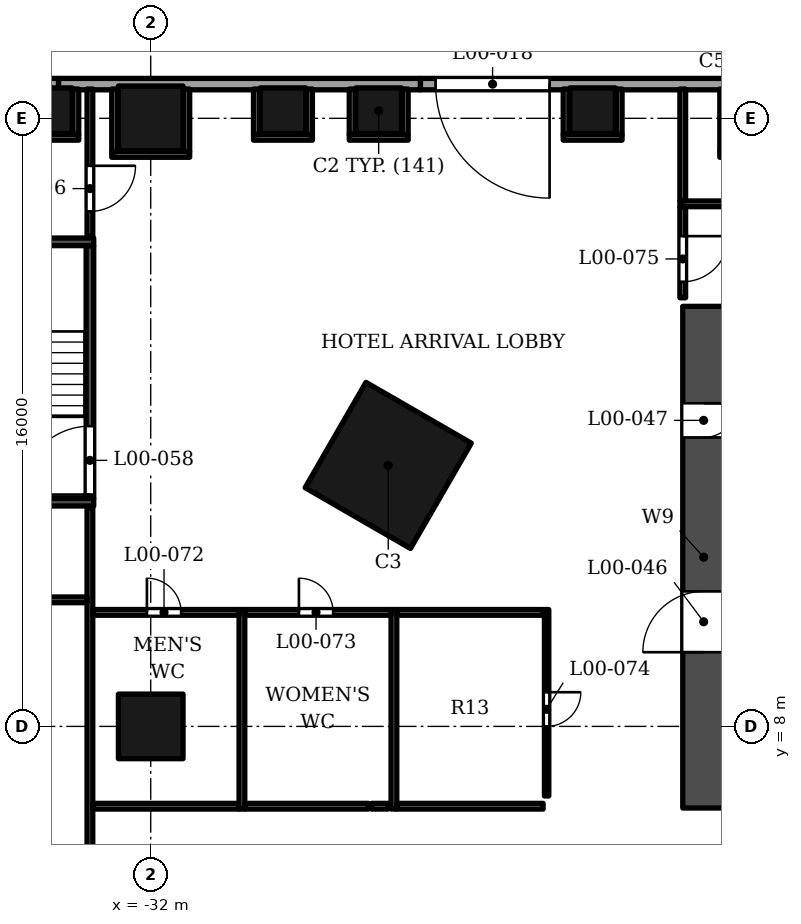
"""IFC4 building model, lengths in metres.
Left out: names, types, materials, properties, quantities, classifications, styles, units other than length and angle.
Written with IfcOpenShell. Run it as: python <this file> out.ifc"""

import sys

from ifc_helpers import new_model, si_unit, direction, frame, frame_2d, origin, origin_2d, place, context, subcontext, project, spatial, rectangle, extrude, element, fill, save


model = new_model("IFC4")
c1 = context("Model", 3, precision=1e-05, world=origin(), true_north=direction((0.0, 1.0)))
c2 = subcontext(c1, "Body", "Model", "MODEL_VIEW")
j1 = project(units=[si_unit("LENGTHUNIT", "METRE"), si_unit("PLANEANGLEUNIT", "RADIAN")], contexts=[c1])
p1 = place(None, origin())
s1 = spatial("IfcSite", under=j1, at=p1, CompositionType="ELEMENT")
p2 = place(p1, origin())
s2 = spatial("IfcBuilding", under=s1, at=p2, CompositionType="ELEMENT")
p3 = place(p2, origin())
s3 = spatial("IfcBuildingStorey", under=s2, at=p3, CompositionType="ELEMENT", Elevation=0.0)
for number, where, z_axis, x_axis in (
    (1, (-32.0, 8.0, 0.0), (0.0, 0.0, 1.0), (1.0, 0.0, 0.0)),
    (2, (-32.0, 24.0, 0.0), (0.0, 0.0, 1.0), (1.0, 0.0, 0.0)),
):
    element("IfcColumn", number, at=place(p3, frame(where, z_axis=z_axis, x_axis=x_axis)), inside=s3, PredefinedType="COLUMN", context=c2, shape_type="SweptSolid", body=[
        extrude(rectangle(XDim=1.7, YDim=1.7, at=origin_2d()), origin(), (0.0, 0.0, 1.0), 9.0),
    ])
for number, where, z_axis, x_axis in (
    (3, (-34.669, 24.2, 0.0), (0.0, 0.0, 1.0), (1.0, 0.0, 0.0)),
    (4, (-26.002, 24.2, 0.0), (0.0, 0.0, 1.0), (1.0, 0.0, 0.0)),
    (5, (-28.52, 24.2, 0.0), (0.0, 0.0, 1.0), (1.0, 0.0, 0.0)),
    (6, (-20.372, 24.2, 0.0), (0.0, 0.0, 1.0), (1.0, 0.0, 0.0)),
):
    element("IfcColumn", number, at=place(p3, frame(where, z_axis=z_axis, x_axis=x_axis)), inside=s3, PredefinedType="COLUMN", context=c2, shape_type="SweptSolid", body=[
        extrude(rectangle(XDim=1.2, YDim=1.2, at=origin_2d()), origin(), (0.0, 0.0, 1.0), 9.0),
    ])
p4 = place(p3, frame((-25.75, 14.867, 0.0), z_axis=(0.0, 0.0, 1.0), x_axis=(0.866025386331, -0.50000003023, 0.0)))
e7 = element("IfcColumn", 7, at=p4, inside=s3, PredefinedType="COLUMN", context=c2, shape_type="SweptSolid", body=[
    extrude(rectangle(XDim=3.2, YDim=3.2, at=origin_2d()), origin(), (0.0, 0.0, 1.0), 9.0),
])
p5 = place(p3, frame((-17.45, 5.853, 0.0), z_axis=(0.0, 0.0, 1.0), x_axis=(0.0, 1.0, 0.0)))
e8 = element("IfcWall", 8, at=p5, inside=s3, PredefinedType="SHEAR", context=c2, shape_type="SweptSolid", body=[
    extrude(rectangle(XDim=13.2, YDim=1.1, at=frame_2d((6.6, 0.0))), origin(), (0.0, 0.0, 1.0), 9.0),
])
p6 = place(p5, frame((4.1, 0.0, 0.0)))
e9 = element("IfcOpeningElement", 9, at=p6, cuts=e8, PredefinedType="OPENING", context=c2, shape_type="SweptSolid", body=[
    extrude(rectangle(XDim=1.6, YDim=2.1, at=frame_2d((0.8, 1.05))), frame((0.0, 0.56, 0.0), z_axis=(0.0, -1.0, 0.0), x_axis=(1.0, 0.0, 0.0)), (0.0, 0.0, 1.0), 1.12),
])
p7 = place(p5, frame((9.75, 0.0, 0.0)))
e10 = element("IfcOpeningElement", 10, at=p7, cuts=e8, PredefinedType="OPENING", context=c2, shape_type="SweptSolid", body=[
    extrude(rectangle(XDim=0.9, YDim=2.1, at=frame_2d((0.45, 1.05))), frame((0.0, 0.56, 0.0), z_axis=(0.0, -1.0, 0.0), x_axis=(1.0, 0.0, 0.0)), (0.0, 0.0, 1.0), 1.12),
])
p8 = place(p3, frame((0.246, 24.9, 0.0), z_axis=(0.0, 0.0, 1.0), x_axis=(-1.0, 0.0, 0.0)))
e11 = element("IfcWall", 11, at=p8, inside=s3, PredefinedType="ELEMENTEDWALL", context=c2, shape_type="SweptSolid", body=[
    extrude(rectangle(XDim=25.15, YDim=0.3, at=frame_2d((12.575, 0.0))), origin(), (0.0, 0.0, 1.0), 7.6),
])
p9 = place(p8, frame((21.75, 0.0, 0.0)))
e12 = element("IfcOpeningElement", 12, at=p9, cuts=e11, PredefinedType="OPENING", context=c2, shape_type="SweptSolid", body=[
    extrude(rectangle(XDim=3.0, YDim=2.7, at=frame_2d((1.5, 1.35))), frame((0.0, 0.16, 0.0), z_axis=(0.0, -1.0, 0.0), x_axis=(1.0, 0.0, 0.0)), (0.0, 0.0, 1.0), 0.32),
])
for number, where, z_axis, x_axis in (
    (13, (-24.904, 24.9, 0.0), (0.0, 0.0, 1.0), (-1.0, 0.0, 0.0)),
    (14, (-34.427, 24.9, 0.0), (0.0, 0.0, 1.0), (-1.0, 0.0, 0.0)),
):
    element("IfcWall", number, at=place(p3, frame(where, z_axis=z_axis, x_axis=x_axis)), inside=s3, PredefinedType="SOLIDWALL", context=c2, shape_type="SweptSolid", body=[
        extrude(rectangle(XDim=9.523, YDim=0.3, at=frame_2d((4.761, 0.0))), origin(), (0.0, 0.0, 1.0), 7.6),
    ])
for number, where, z_axis, x_axis in (
    (15, (-38.37, 13.9, 0.0), (0.0, 0.0, 1.0), (1.0, 0.0, 0.0)),
    (16, (-38.37, 20.75, 0.0), (0.0, 0.0, 1.0), (1.0, 0.0, 0.0)),
):
    element("IfcWall", number, at=place(p3, frame(where, z_axis=z_axis, x_axis=x_axis)), inside=s3, PredefinedType="SOLIDWALL", context=c2, shape_type="SweptSolid", body=[
        extrude(rectangle(XDim=4.87, YDim=0.2, at=frame_2d((2.435, 0.0))), origin(), (0.0, 0.0, 1.0), 8.5),
    ])
p10 = place(p3, frame((-33.6, 14.0, 0.0), z_axis=(0.0, 0.0, 1.0), x_axis=(0.0, 1.0, 0.0)))
e17 = element("IfcWall", 17, at=p10, inside=s3, PredefinedType="SOLIDWALL", context=c2, shape_type="SweptSolid", body=[
    extrude(rectangle(XDim=6.65, YDim=0.2, at=frame_2d((3.325, 0.0))), origin(), (0.0, 0.0, 1.0), 8.5),
])
p11 = place(p10, frame((0.1, 0.0, 0.0)))
e18 = element("IfcOpeningElement", 18, at=p11, cuts=e17, PredefinedType="OPENING", context=c2, shape_type="SweptSolid", body=[
    extrude(rectangle(XDim=1.8, YDim=2.4, at=frame_2d((0.9, 1.2))), frame((0.0, 0.11, 0.0), z_axis=(0.0, -1.0, 0.0), x_axis=(1.0, 0.0, 0.0)), (0.0, 0.0, 1.0), 0.22),
])
p12 = place(p3, frame((-33.6, 4.69, 0.0), z_axis=(0.0, 0.0, 1.0), x_axis=(0.0, 1.0, 0.0)))
e19 = element("IfcWall", 19, at=p12, inside=s3, PredefinedType="PARTITIONING", context=c2, shape_type="SweptSolid", body=[
    extrude(rectangle(XDim=9.07, YDim=0.15, at=frame_2d((4.535, 0.0))), origin(), (0.0, 0.0, 1.0), 7.3),
])
p13 = place(p3, frame((-33.525, 5.9, 0.0), z_axis=(0.0, 0.0, 1.0), x_axis=(1.0, 0.0, 0.0)))
e20 = element("IfcWall", 20, at=p13, inside=s3, PredefinedType="PARTITIONING", context=c2, shape_type="SweptSolid", body=[
    extrude(rectangle(XDim=3.85, YDim=0.15, at=frame_2d((1.925, 0.0))), origin(), (0.0, 0.0, 1.0), 7.3),
])
p14 = place(p3, frame((-29.6, 5.825, 0.0), z_axis=(0.0, 0.0, 1.0), x_axis=(0.0, 1.0, 0.0)))
e21 = element("IfcWall", 21, at=p14, inside=s3, PredefinedType="PARTITIONING", context=c2, shape_type="SweptSolid", body=[
    extrude(rectangle(XDim=5.25, YDim=0.15, at=frame_2d((2.625, 0.0))), origin(), (0.0, 0.0, 1.0), 7.3),
])
p15 = place(p3, frame((-29.525, 5.9, 0.0), z_axis=(0.0, 0.0, 1.0), x_axis=(1.0, 0.0, 0.0)))
e22 = element("IfcWall", 22, at=p15, inside=s3, PredefinedType="PARTITIONING", context=c2, shape_type="SweptSolid", body=[
    extrude(rectangle(XDim=3.255, YDim=0.15, at=frame_2d((1.627, 0.0))), origin(), (0.0, 0.0, 1.0), 8.5),
])
p16 = place(p3, frame((-25.6, 5.825, 0.0), z_axis=(0.0, 0.0, 1.0), x_axis=(0.0, 1.0, 0.0)))
e23 = element("IfcWall", 23, at=p16, inside=s3, PredefinedType="PARTITIONING", context=c2, shape_type="SweptSolid", body=[
    extrude(rectangle(XDim=5.25, YDim=0.15, at=frame_2d((2.625, 0.0))), origin(), (0.0, 0.0, 1.0), 7.3),
])
p17 = place(p3, frame((-25.525, 5.9, 0.0), z_axis=(0.0, 0.0, 1.0), x_axis=(1.0, 0.0, 0.0)))
e24 = element("IfcWall", 24, at=p17, inside=s3, PredefinedType="PARTITIONING", context=c2, shape_type="SweptSolid", body=[
    extrude(rectangle(XDim=3.85, YDim=0.15, at=frame_2d((1.925, 0.0))), origin(), (0.0, 0.0, 1.0), 7.6),
])
p18 = place(p3, frame((-21.583, 6.17, 0.0), z_axis=(0.0, 0.0, 1.0), x_axis=(0.0, 1.0, 0.0)))
e25 = element("IfcWall", 25, at=p18, inside=s3, PredefinedType="PARTITIONING", context=c2, shape_type="SweptSolid", body=[
    extrude(rectangle(XDim=4.905, YDim=0.115, at=frame_2d((2.453, 0.0))), origin(), (0.0, 0.0, 1.0), 7.3),
])
p19 = place(p18, frame((1.83, 0.0, 0.0)))
e26 = element("IfcOpeningElement", 26, at=p19, cuts=e25, PredefinedType="OPENING", context=c2, shape_type="SweptSolid", body=[
    extrude(rectangle(XDim=0.9, YDim=2.1, at=frame_2d((0.45, 1.05))), frame((0.0, 0.067, 0.0), z_axis=(0.0, -1.0, 0.0), x_axis=(1.0, 0.0, 0.0)), (0.0, 0.0, 1.0), 0.135),
])
p20 = place(p3, frame((-33.525, 11.0, 0.0), z_axis=(0.0, 0.0, 1.0), x_axis=(1.0, 0.0, 0.0)))
e27 = element("IfcWall", 27, at=p20, inside=s3, PredefinedType="PARTITIONING", context=c2, shape_type="SweptSolid", body=[
    extrude(rectangle(XDim=3.85, YDim=0.15, at=frame_2d((1.925, 0.0))), origin(), (0.0, 0.0, 1.0), 7.3),
])
p21 = place(p20, frame((1.425, 0.0, 0.0)))
e28 = element("IfcOpeningElement", 28, at=p21, cuts=e27, PredefinedType="OPENING", context=c2, shape_type="SweptSolid", body=[
    extrude(rectangle(XDim=0.9, YDim=2.1, at=frame_2d((0.45, 1.05))), frame((0.0, 0.085, 0.0), z_axis=(0.0, -1.0, 0.0), x_axis=(1.0, 0.0, 0.0)), (0.0, 0.0, 1.0), 0.17),
])
p22 = place(p3, frame((-29.525, 11.0, 0.0), z_axis=(0.0, 0.0, 1.0), x_axis=(1.0, 0.0, 0.0)))
e29 = element("IfcWall", 29, at=p22, inside=s3, PredefinedType="PARTITIONING", context=c2, shape_type="SweptSolid", body=[
    extrude(rectangle(XDim=3.85, YDim=0.15, at=frame_2d((1.925, 0.0))), origin(), (0.0, 0.0, 1.0), 8.5),
])
p23 = place(p22, frame((1.425, 0.0, 0.0)))
e30 = element("IfcOpeningElement", 30, at=p23, cuts=e29, PredefinedType="OPENING", context=c2, shape_type="SweptSolid", body=[
    extrude(rectangle(XDim=0.9, YDim=2.1, at=frame_2d((0.45, 1.05))), frame((0.0, 0.085, 0.0), z_axis=(0.0, -1.0, 0.0), x_axis=(1.0, 0.0, 0.0)), (0.0, 0.0, 1.0), 0.17),
])
p24 = place(p3, frame((-25.525, 11.0, 0.0), z_axis=(0.0, 0.0, 1.0), x_axis=(1.0, 0.0, 0.0)))
e31 = element("IfcWall", 31, at=p24, inside=s3, PredefinedType="PARTITIONING", context=c2, shape_type="SweptSolid", body=[
    extrude(rectangle(XDim=3.85, YDim=0.15, at=frame_2d((1.925, 0.0))), origin(), (0.0, 0.0, 1.0), 7.6),
])
p25 = place(p3, frame((-38.6, 11.33, 0.0), z_axis=(0.0, 0.0, 1.0), x_axis=(1.0, 0.0, 0.0)))
e32 = element("IfcWall", 32, at=p25, inside=s3, PredefinedType="PARTITIONING", context=c2, shape_type="SweptSolid", body=[
    extrude(rectangle(XDim=4.925, YDim=0.15, at=frame_2d((2.462, 0.0))), origin(), (0.0, 0.0, 1.0), 8.5),
])
p26 = place(p3, frame((-18.0, 19.278, 0.0), z_axis=(0.0, 0.0, 1.0), x_axis=(0.0, 1.0, 0.0)))
e33 = element("IfcWall", 33, at=p26, inside=s3, PredefinedType="PARTITIONING", context=c2, shape_type="SweptSolid", body=[
    extrude(rectangle(XDim=2.397, YDim=0.15, at=frame_2d((1.198, 0.0))), origin(), (0.0, 0.0, 1.0), 8.5),
])
p27 = place(p26, frame((0.422, 0.0, 0.0)))
e34 = element("IfcOpeningElement", 34, at=p27, cuts=e33, PredefinedType="OPENING", context=c2, shape_type="SweptSolid", body=[
    extrude(rectangle(XDim=1.2, YDim=2.1, at=frame_2d((0.6, 1.05))), frame((0.0, 0.085, 0.0), z_axis=(0.0, -1.0, 0.0), x_axis=(1.0, 0.0, 0.0)), (0.0, 0.0, 1.0), 0.17),
])
p28 = place(p3, frame((-33.6, 20.89, 0.0), z_axis=(0.0, 0.0, 1.0), x_axis=(0.0, 1.0, 0.0)))
e35 = element("IfcWall", 35, at=p28, inside=s3, PredefinedType="PARTITIONING", context=c2, shape_type="SweptSolid", body=[
    extrude(rectangle(XDim=3.88, YDim=0.15, at=frame_2d((1.94, 0.0))), origin(), (0.0, 0.0, 1.0), 7.6),
])
p29 = place(p28, frame((0.661, 0.0, 0.0)))
e36 = element("IfcOpeningElement", 36, at=p29, cuts=e35, PredefinedType="OPENING", context=c2, shape_type="SweptSolid", body=[
    extrude(rectangle(XDim=1.2, YDim=2.1, at=frame_2d((0.6, 1.05))), frame((0.0, 0.085, 0.0), z_axis=(0.0, -1.0, 0.0), x_axis=(1.0, 0.0, 0.0)), (0.0, 0.0, 1.0), 0.17),
])
p30 = place(p3, frame((-18.075, 21.75, 0.0), z_axis=(0.0, 0.0, 1.0), x_axis=(1.0, 0.0, 0.0)))
e37 = element("IfcWall", 37, at=p30, inside=s3, PredefinedType="PARTITIONING", context=c2, shape_type="SweptSolid", body=[
    extrude(rectangle(XDim=36.15, YDim=0.15, at=frame_2d((18.075, 0.0))), origin(), (0.0, 0.0, 1.0), 7.3),
])
p31 = place(p30, frame((2.675, 0.0, 0.0)))
e38 = element("IfcOpeningElement", 38, at=p31, cuts=e37, PredefinedType="OPENING", context=c2, shape_type="SweptSolid", body=[
    extrude(rectangle(XDim=0.9, YDim=2.1, at=frame_2d((0.45, 1.05))), frame((0.0, 0.085, 0.0), z_axis=(0.0, -1.0, 0.0), x_axis=(1.0, 0.0, 0.0)), (0.0, 0.0, 1.0), 0.17),
])
p32 = place(p30, frame((8.675, 0.0, 0.0)))
e39 = element("IfcOpeningElement", 39, at=p32, cuts=e37, PredefinedType="OPENING", context=c2, shape_type="SweptSolid", body=[
    extrude(rectangle(XDim=0.9, YDim=2.1, at=frame_2d((0.45, 1.05))), frame((0.0, 0.085, 0.0), z_axis=(0.0, -1.0, 0.0), x_axis=(1.0, 0.0, 0.0)), (0.0, 0.0, 1.0), 0.17),
])
p33 = place(p30, frame((14.675, 0.0, 0.0)))
e40 = element("IfcOpeningElement", 40, at=p33, cuts=e37, PredefinedType="OPENING", context=c2, shape_type="SweptSolid", body=[
    extrude(rectangle(XDim=0.9, YDim=2.1, at=frame_2d((0.45, 1.05))), frame((0.0, 0.085, 0.0), z_axis=(0.0, -1.0, 0.0), x_axis=(1.0, 0.0, 0.0)), (0.0, 0.0, 1.0), 0.17),
])
p34 = place(p30, frame((20.675, 0.0, 0.0)))
e41 = element("IfcOpeningElement", 41, at=p34, cuts=e37, PredefinedType="OPENING", context=c2, shape_type="SweptSolid", body=[
    extrude(rectangle(XDim=0.9, YDim=2.1, at=frame_2d((0.45, 1.05))), frame((0.0, 0.085, 0.0), z_axis=(0.0, -1.0, 0.0), x_axis=(1.0, 0.0, 0.0)), (0.0, 0.0, 1.0), 0.17),
])
p35 = place(p30, frame((26.675, 0.0, 0.0)))
e42 = element("IfcOpeningElement", 42, at=p35, cuts=e37, PredefinedType="OPENING", context=c2, shape_type="SweptSolid", body=[
    extrude(rectangle(XDim=0.9, YDim=2.1, at=frame_2d((0.45, 1.05))), frame((0.0, 0.085, 0.0), z_axis=(0.0, -1.0, 0.0), x_axis=(1.0, 0.0, 0.0)), (0.0, 0.0, 1.0), 0.17),
])
p36 = place(p30, frame((32.675, 0.0, 0.0)))
e43 = element("IfcOpeningElement", 43, at=p36, cuts=e37, PredefinedType="OPENING", context=c2, shape_type="SweptSolid", body=[
    extrude(rectangle(XDim=0.9, YDim=2.1, at=frame_2d((0.45, 1.05))), frame((0.0, 0.085, 0.0), z_axis=(0.0, -1.0, 0.0), x_axis=(1.0, 0.0, 0.0)), (0.0, 0.0, 1.0), 0.17),
])
p37 = place(p3, frame((-18.0, 21.825, 0.0), z_axis=(0.0, 0.0, 1.0), x_axis=(0.0, 1.0, 0.0)))
e44 = element("IfcWall", 44, at=p37, inside=s3, PredefinedType="PARTITIONING", context=c2, shape_type="SweptSolid", body=[
    extrude(rectangle(XDim=2.945, YDim=0.15, at=frame_2d((1.473, 0.0))), origin(), (0.0, 0.0, 1.0), 7.3),
])
for number, where, z_axis, x_axis in (
    (45, (-33.025, 23.05, 0.0), (0.0, 0.0, 1.0), (1.0, 0.0, 0.0)),
    (46, (-17.025, 23.05, 0.0), (0.0, 0.0, 1.0), (1.0, 0.0, 0.0)),
):
    element("IfcWall", number, at=place(p3, frame(where, z_axis=z_axis, x_axis=x_axis)), inside=s3, PredefinedType="PARTITIONING", context=c2, shape_type="SweptSolid", body=[
        extrude(rectangle(XDim=2.05, YDim=0.15, at=frame_2d((1.025, 0.0))), origin(), (0.0, 0.0, 1.0), 7.3),
    ])
p38 = place(p3, frame((-32.95, 23.125, 0.0), z_axis=(0.0, 0.0, 1.0), x_axis=(0.0, 1.0, 0.0)))
e47 = element("IfcWall", 47, at=p38, inside=s3, PredefinedType="PARTITIONING", context=c2, shape_type="SweptSolid", body=[
    extrude(rectangle(XDim=1.645, YDim=0.15, at=frame_2d((0.823, 0.0))), origin(), (0.0, 0.0, 1.0), 7.6),
])
for number, where, z_axis, x_axis in (
    (48, (-31.05, 23.125, 0.0), (0.0, 0.0, 1.0), (0.0, 1.0, 0.0)),
    (49, (-16.95, 23.125, 0.0), (0.0, 0.0, 1.0), (0.0, 1.0, 0.0)),
):
    element("IfcWall", number, at=place(p3, frame(where, z_axis=z_axis, x_axis=x_axis)), inside=s3, PredefinedType="PARTITIONING", context=c2, shape_type="SweptSolid", body=[
        extrude(rectangle(XDim=1.645, YDim=0.15, at=frame_2d((0.823, 0.0))), origin(), (0.0, 0.0, 1.0), 7.3),
    ])
p39 = place(p3, frame((-35.444, 23.5, 0.0), z_axis=(0.0, 0.0, 1.0), x_axis=(1.0, 0.0, 0.0)))
e50 = element("IfcWall", 50, at=p39, inside=s3, PredefinedType="PARTITIONING", context=c2, shape_type="SweptSolid", body=[
    extrude(rectangle(XDim=1.55, YDim=0.15, at=frame_2d((0.775, 0.0))), origin(), (0.0, 0.0, 1.0), 8.5),
])
for number, where, z_axis, x_axis in (
    (51, (-29.295, 23.5, 0.0), (0.0, 0.0, 1.0), (1.0, 0.0, 0.0)),
    (52, (-26.776, 23.5, 0.0), (0.0, 0.0, 1.0), (1.0, 0.0, 0.0)),
):
    element("IfcWall", number, at=place(p3, frame(where, z_axis=z_axis, x_axis=x_axis)), inside=s3, PredefinedType="PARTITIONING", context=c2, shape_type="SweptSolid", body=[
        extrude(rectangle(XDim=1.55, YDim=0.15, at=frame_2d((0.775, 0.0))), origin(), (0.0, 0.0, 1.0), 8.5),
    ])
p40 = place(p3, frame((-21.146, 23.5, 0.0), z_axis=(0.0, 0.0, 1.0), x_axis=(1.0, 0.0, 0.0)))
e53 = element("IfcWall", 53, at=p40, inside=s3, PredefinedType="PARTITIONING", context=c2, shape_type="SweptSolid", body=[
    extrude(rectangle(XDim=1.549, YDim=0.15, at=frame_2d((0.774, 0.0))), origin(), (0.0, 0.0, 1.0), 8.5),
])
p41 = place(p3, frame((-33.969, 23.575, 0.0), z_axis=(0.0, 0.0, 1.0), x_axis=(0.0, 1.0, 0.0)))
e54 = element("IfcWall", 54, at=p41, inside=s3, PredefinedType="PARTITIONING", context=c2, shape_type="SweptSolid", body=[
    extrude(rectangle(XDim=1.195, YDim=0.15, at=frame_2d((0.598, 0.0))), origin(), (0.0, 0.0, 1.0), 7.6),
])
p42 = place(p3, frame((-29.22, 23.575, 0.0), z_axis=(0.0, 0.0, 1.0), x_axis=(0.0, 1.0, 0.0)))
e55 = element("IfcWall", 55, at=p42, inside=s3, PredefinedType="PARTITIONING", context=c2, shape_type="SweptSolid", body=[
    extrude(rectangle(XDim=1.195, YDim=0.15, at=frame_2d((0.598, 0.0))), origin(), (0.0, 0.0, 1.0), 7.3),
])
for number, where, z_axis, x_axis in (
    (56, (-27.82, 23.575, 0.0), (0.0, 0.0, 1.0), (0.0, 1.0, 0.0)),
    (57, (-26.701, 23.575, 0.0), (0.0, 0.0, 1.0), (0.0, 1.0, 0.0)),
):
    element("IfcWall", number, at=place(p3, frame(where, z_axis=z_axis, x_axis=x_axis)), inside=s3, PredefinedType="PARTITIONING", context=c2, shape_type="SweptSolid", body=[
        extrude(rectangle(XDim=1.195, YDim=0.15, at=frame_2d((0.598, 0.0))), origin(), (0.0, 0.0, 1.0), 7.6),
    ])
for number, where, z_axis, x_axis in (
    (58, (-25.301, 23.575, 0.0), (0.0, 0.0, 1.0), (0.0, 1.0, 0.0)),
    (59, (-21.071, 23.575, 0.0), (0.0, 0.0, 1.0), (0.0, 1.0, 0.0)),
):
    element("IfcWall", number, at=place(p3, frame(where, z_axis=z_axis, x_axis=x_axis)), inside=s3, PredefinedType="PARTITIONING", context=c2, shape_type="SweptSolid", body=[
        extrude(rectangle(XDim=1.195, YDim=0.15, at=frame_2d((0.598, 0.0))), origin(), (0.0, 0.0, 1.0), 7.3),
    ])
p43 = place(p3, frame((-19.671, 23.575, 0.0), z_axis=(0.0, 0.0, 1.0), x_axis=(0.0, 1.0, 0.0)))
e60 = element("IfcWall", 60, at=p43, inside=s3, PredefinedType="PARTITIONING", context=c2, shape_type="SweptSolid", body=[
    extrude(rectangle(XDim=1.195, YDim=0.149, at=frame_2d((0.598, 0.0))), origin(), (0.0, 0.0, 1.0), 7.3),
])
p44 = place(p3, frame((-26.19, 5.9, 0.0), z_axis=(0.0, 0.0, 1.0), x_axis=(1.0, 0.0, 0.0)))
e61 = element("IfcWall", 61, at=p44, inside=s3, PredefinedType="PARTITIONING", context=c2, shape_type="SweptSolid", body=[
    extrude(rectangle(XDim=0.435, YDim=0.15, at=frame_2d((0.218, 0.0))), origin(), (0.0, 0.0, 1.0), 8.5),
])
p45 = place(p9, origin())
e62 = element("IfcDoor", 62, at=p45, inside=s3, OperationType="DOUBLE_DOOR_SINGLE_SWING", PredefinedType="DOOR", context=c2, shape_type="SweptSolid", body=[
    extrude(rectangle(XDim=3.0, YDim=2.7, at=frame_2d((1.5, 1.35))), frame((0.0, 0.025, 0.0), z_axis=(0.0, -1.0, 0.0), x_axis=(1.0, 0.0, 0.0)), (0.0, 0.0, 1.0), 0.05),
])
fill(e12, e62)
p46 = place(p6, origin())
e63 = element("IfcDoor", 63, at=p46, inside=s3, OperationType="DOUBLE_DOOR_SINGLE_SWING", PredefinedType="DOOR", context=c2, shape_type="SweptSolid", body=[
    extrude(rectangle(XDim=1.6, YDim=2.1, at=frame_2d((0.8, 1.05))), frame((0.0, -0.225, 0.0), z_axis=(0.0, -1.0, 0.0), x_axis=(1.0, 0.0, 0.0)), (0.0, 0.0, 1.0), 0.05),
])
fill(e9, e63)
p47 = place(p7, origin())
e64 = element("IfcDoor", 64, at=p47, inside=s3, OperationType="SINGLE_SWING_RIGHT", PredefinedType="DOOR", context=c2, shape_type="SweptSolid", body=[
    extrude(rectangle(XDim=0.9, YDim=2.1, at=frame_2d((0.45, 1.05))), frame((0.0, -0.225, 0.0), z_axis=(0.0, -1.0, 0.0), x_axis=(1.0, 0.0, 0.0)), (0.0, 0.0, 1.0), 0.05),
])
fill(e10, e64)
p48 = place(p11, origin())
e65 = element("IfcDoor", 65, at=p48, inside=s3, OperationType="DOUBLE_DOOR_SINGLE_SWING", PredefinedType="DOOR", context=c2, shape_type="SweptSolid", body=[
    extrude(rectangle(XDim=1.8, YDim=2.4, at=frame_2d((0.9, 1.2))), frame((0.0, 0.025, 0.0), z_axis=(0.0, -1.0, 0.0), x_axis=(1.0, 0.0, 0.0)), (0.0, 0.0, 1.0), 0.05),
])
fill(e18, e65)
p49 = place(p21, origin())
e66 = element("IfcDoor", 66, at=p49, inside=s3, OperationType="SINGLE_SWING_LEFT", PredefinedType="DOOR", context=c2, shape_type="SweptSolid", body=[
    extrude(rectangle(XDim=0.9, YDim=2.1, at=frame_2d((0.45, 1.05))), frame((0.0, 0.025, 0.0), z_axis=(0.0, -1.0, 0.0), x_axis=(1.0, 0.0, 0.0)), (0.0, 0.0, 1.0), 0.05),
])
fill(e28, e66)
p50 = place(p23, origin())
e67 = element("IfcDoor", 67, at=p50, inside=s3, OperationType="SINGLE_SWING_LEFT", PredefinedType="DOOR", context=c2, shape_type="SweptSolid", body=[
    extrude(rectangle(XDim=0.9, YDim=2.1, at=frame_2d((0.45, 1.05))), frame((0.0, 0.025, 0.0), z_axis=(0.0, -1.0, 0.0), x_axis=(1.0, 0.0, 0.0)), (0.0, 0.0, 1.0), 0.05),
])
fill(e30, e67)
p51 = place(p19, origin())
e68 = element("IfcDoor", 68, at=p51, inside=s3, OperationType="SINGLE_SWING_RIGHT", PredefinedType="DOOR", context=c2, shape_type="SweptSolid", body=[
    extrude(rectangle(XDim=0.9, YDim=2.1, at=frame_2d((0.45, 1.05))), frame((0.0, 0.025, 0.0), z_axis=(0.0, -1.0, 0.0), x_axis=(1.0, 0.0, 0.0)), (0.0, 0.0, 1.0), 0.05),
])
fill(e26, e68)
p52 = place(p27, origin())
e69 = element("IfcDoor", 69, at=p52, inside=s3, OperationType="SINGLE_SWING_RIGHT", PredefinedType="DOOR", context=c2, shape_type="SweptSolid", body=[
    extrude(rectangle(XDim=1.2, YDim=2.1, at=frame_2d((0.6, 1.05))), frame((0.0, 0.025, 0.0), z_axis=(0.0, -1.0, 0.0), x_axis=(1.0, 0.0, 0.0)), (0.0, 0.0, 1.0), 0.05),
])
fill(e34, e69)
p53 = place(p29, origin())
e70 = element("IfcDoor", 70, at=p53, inside=s3, OperationType="SINGLE_SWING_RIGHT", PredefinedType="DOOR", context=c2, shape_type="SweptSolid", body=[
    extrude(rectangle(XDim=1.2, YDim=2.1, at=frame_2d((0.6, 1.05))), frame((0.0, 0.025, 0.0), z_axis=(0.0, -1.0, 0.0), x_axis=(1.0, 0.0, 0.0)), (0.0, 0.0, 1.0), 0.05),
])
fill(e36, e70)
save(model, sys.argv[1])
